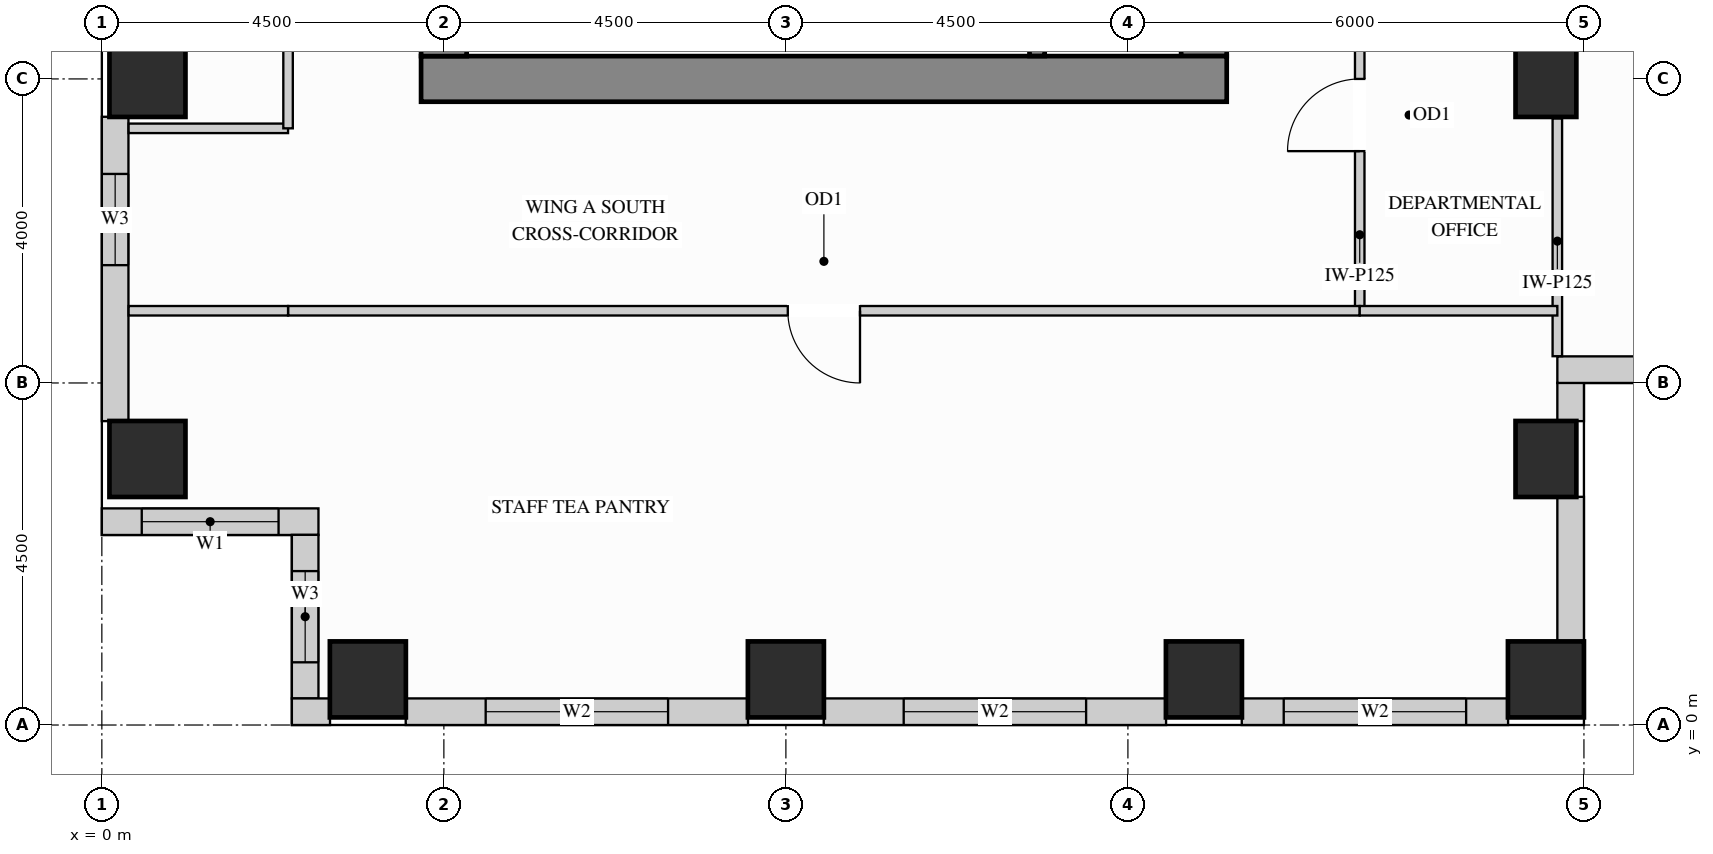
"""IFC4 building model, lengths in metres.
Left out: names, types, materials, properties, quantities, classifications, styles, units other than length and angle.
Written with IfcOpenShell. Run it as: python <this file> out.ifc"""

import sys

from ifc_helpers import new_model, si_unit, direction, frame, frame_2d, origin, origin_2d, place, context, subcontext, project, spatial, rectangle, extrude, source, transform, mapped, element, fill, save


model = new_model("IFC4")
c1 = context("Model", 3, precision=1e-05, world=origin(), true_north=direction((0.0, 1.0)))
c2 = subcontext(c1, "Body", "Model", "MODEL_VIEW")
j1 = project(units=[si_unit("LENGTHUNIT", "METRE"), si_unit("PLANEANGLEUNIT", "RADIAN")], contexts=[c1])
p1 = place(None, origin())
s1 = spatial("IfcSite", under=j1, at=p1, CompositionType="ELEMENT")
p2 = place(p1, origin())
s2 = spatial("IfcBuilding", under=s1, at=p2, CompositionType="ELEMENT")
p3 = place(p2, frame((0.0, 0.0, 146.7)))
s3 = spatial("IfcBuildingStorey", under=s2, at=p3, CompositionType="ELEMENT", Elevation=146.7)
m1 = source(origin(), c2, "Body", "SweptSolid", [
    extrude(rectangle(XDim=0.8, YDim=1.0, at=origin_2d()), origin(), (0.0, 0.0, 1.0), 3.4),
])
for number, where, z_axis, x_axis in (
    (1, (19.0, 3.5, 0.0), (0.0, 0.0, 1.0), (1.0, 0.0, 0.0)),
    (2, (19.0, 8.5, 0.0), (0.0, 0.0, 1.0), (1.0, 0.0, 0.0)),
):
    element("IfcColumn", number, at=place(p3, frame(where, z_axis=z_axis, x_axis=x_axis)), inside=s3, PredefinedType="COLUMN", context=c2, shape_type="MappedRepresentation", body=[
        mapped(m1, transform((0.0, 0.0, 0.0), x_axis=(1.0, 0.0, 0.0), y_axis=(0.0, 1.0, 0.0), z_axis=(0.0, 0.0, 1.0))),
    ])
m2 = source(origin(), c2, "Body", "SweptSolid", [
    extrude(rectangle(XDim=1.0, YDim=1.0, at=origin_2d()), origin(), (0.0, 0.0, 1.0), 3.4),
])
for number, where, z_axis, x_axis in (
    (3, (14.5, 0.6, 0.0), (0.0, 0.0, 1.0), (1.0, 0.0, 0.0)),
    (4, (19.0, 0.6, 0.0), (0.0, 0.0, 1.0), (1.0, 0.0, 0.0)),
    (5, (3.5, 0.6, 0.0), (0.0, 0.0, 1.0), (1.0, 0.0, 0.0)),
    (6, (9.0, 0.6, 0.0), (0.0, 0.0, 1.0), (1.0, 0.0, 0.0)),
    (7, (0.6, 3.5, 0.0), (0.0, 0.0, 1.0), (1.0, 0.0, 0.0)),
    (8, (0.6, 8.5, 0.0), (0.0, 0.0, 1.0), (1.0, 0.0, 0.0)),
):
    element("IfcColumn", number, at=place(p3, frame(where, z_axis=z_axis, x_axis=x_axis)), inside=s3, PredefinedType="COLUMN", context=c2, shape_type="MappedRepresentation", body=[
        mapped(m2, transform((0.0, 0.0, 0.0), x_axis=(1.0, 0.0, 0.0), y_axis=(0.0, 1.0, 0.0), z_axis=(0.0, 0.0, 1.0))),
    ])
m3 = source(origin(), c2, "Body", "SweptSolid", [
    extrude(rectangle(XDim=10.02, YDim=0.6, at=frame_2d((5.01, 0.0))), origin(), (0.0, 0.0, 1.0), 3.4),
])
p4 = place(p3, frame((14.5, 8.8, 0.0), z_axis=(0.0, 0.0, 1.0), x_axis=(0.0, 1.0, 0.0)))
e9 = element("IfcWall", 9, at=p4, inside=s3, PredefinedType="SHEAR", context=c2, shape_type="MappedRepresentation", body=[
    mapped(m3, transform((0.0, 0.0, 0.0), x_axis=(1.0, 0.0, 0.0), y_axis=(0.0, 1.0, 0.0), z_axis=(0.0, 0.0, 1.0))),
])
m4 = source(origin(), c2, "Body", "SweptSolid", [
    extrude(rectangle(XDim=10.6, YDim=0.6, at=frame_2d((5.3, 0.0))), origin(), (0.0, 0.0, 1.0), 3.4),
])
p5 = place(p3, frame((4.2, 8.5, 0.0), z_axis=(0.0, 0.0, 1.0), x_axis=(1.0, 0.0, 0.0)))
e10 = element("IfcWall", 10, at=p5, inside=s3, PredefinedType="SHEAR", context=c2, shape_type="MappedRepresentation", body=[
    mapped(m4, transform((0.0, 0.0, 0.0), x_axis=(1.0, 0.0, 0.0), y_axis=(0.0, 1.0, 0.0), z_axis=(0.0, 0.0, 1.0))),
])
m5 = source(origin(), c2, "Body", "SweptSolid", [
    extrude(rectangle(XDim=20.4, YDim=0.6, at=frame_2d((10.2, 0.0))), origin(), (0.0, 0.0, 1.0), 3.4),
])
p6 = place(p3, frame((4.5, 8.8, 0.0), z_axis=(0.0, 0.0, 1.0), x_axis=(0.0, 1.0, 0.0)))
e11 = element("IfcWall", 11, at=p6, inside=s3, PredefinedType="SHEAR", context=c2, shape_type="MappedRepresentation", body=[
    mapped(m5, transform((0.0, 0.0, 0.0), x_axis=(1.0, 0.0, 0.0), y_axis=(0.0, 1.0, 0.0), z_axis=(0.0, 0.0, 1.0))),
])
p7 = place(p3, frame((0.175, 8.002, 0.0), z_axis=(0.0, 0.0, 1.0), x_axis=(0.0, -1.0, 0.0)))
e12 = element("IfcWall", 12, at=p7, inside=s3, PredefinedType="SOLIDWALL", context=c2, shape_type="SweptSolid", body=[
    extrude(rectangle(XDim=4.004, YDim=0.35, at=frame_2d((2.002, 0.0))), origin(), (0.0, 0.0, 1.0), 2.612),
])
p8 = place(p7, frame((0.752, 0.0, 0.78)))
e13 = element("IfcOpeningElement", 13, at=p8, cuts=e12, PredefinedType="OPENING", context=c2, shape_type="SweptSolid", body=[
    extrude(rectangle(XDim=1.2, YDim=1.652, at=frame_2d((0.6, 0.826))), frame((0.0, 0.185, 0.0), z_axis=(0.0, -1.0, 0.0), x_axis=(1.0, 0.0, 0.0)), (0.0, 0.0, 1.0), 0.37),
])
p9 = place(p3, frame((0.0, 2.675, 0.0), z_axis=(0.0, 0.0, 1.0), x_axis=(1.0, 0.0, 0.0)))
e14 = element("IfcWall", 14, at=p9, inside=s3, PredefinedType="SOLIDWALL", context=c2, shape_type="SweptSolid", body=[
    extrude(rectangle(XDim=2.85, YDim=0.35, at=frame_2d((1.425, 0.0))), origin(), (0.0, 0.0, 1.0), 3.385),
])
p10 = place(p9, frame((0.525, 0.0, 0.78)))
e15 = element("IfcOpeningElement", 15, at=p10, cuts=e14, PredefinedType="OPENING", context=c2, shape_type="SweptSolid", body=[
    extrude(rectangle(XDim=1.8, YDim=2.1, at=frame_2d((0.9, 1.05))), frame((0.0, 0.185, 0.0), z_axis=(0.0, -1.0, 0.0), x_axis=(1.0, 0.0, 0.0)), (0.0, 0.0, 1.0), 0.37),
])
p11 = place(p3, frame((2.675, 2.502, 0.0), z_axis=(0.0, 0.0, 1.0), x_axis=(0.0, -1.0, 0.0)))
e16 = element("IfcWall", 16, at=p11, inside=s3, PredefinedType="SOLIDWALL", context=c2, shape_type="SweptSolid", body=[
    extrude(rectangle(XDim=2.154, YDim=0.35, at=frame_2d((1.077, 0.0))), origin(), (0.0, 0.0, 1.0), 3.385),
])
p12 = place(p11, frame((0.477, 0.0, 0.78)))
e17 = element("IfcOpeningElement", 17, at=p12, cuts=e16, PredefinedType="OPENING", context=c2, shape_type="SweptSolid", body=[
    extrude(rectangle(XDim=1.2, YDim=2.1, at=frame_2d((0.6, 1.05))), frame((0.0, 0.185, 0.0), z_axis=(0.0, -1.0, 0.0), x_axis=(1.0, 0.0, 0.0)), (0.0, 0.0, 1.0), 0.37),
])
m6 = source(origin(), c2, "Body", "SweptSolid", [
    extrude(rectangle(XDim=0.502, YDim=0.35, at=frame_2d((0.251, 0.0))), origin(), (0.0, 0.0, 1.0), 3.385),
])
p13 = place(p3, frame((2.5, 0.175, 0.0), z_axis=(0.0, 0.0, 1.0), x_axis=(1.0, 0.0, 0.0)))
e18 = element("IfcWall", 18, at=p13, inside=s3, PredefinedType="SOLIDWALL", context=c2, shape_type="MappedRepresentation", body=[
    mapped(m6, transform((0.0, 0.0, 0.0), x_axis=(1.0, 0.0, 0.0), y_axis=(0.0, 1.0, 0.0), z_axis=(0.0, 0.0, 1.0))),
])
p14 = place(p3, frame((3.998, 0.175, 0.0), z_axis=(0.0, 0.0, 1.0), x_axis=(1.0, 0.0, 0.0)))
e19 = element("IfcWall", 19, at=p14, inside=s3, PredefinedType="SOLIDWALL", context=c2, shape_type="SweptSolid", body=[
    extrude(rectangle(XDim=4.504, YDim=0.35, at=frame_2d((2.252, 0.0))), origin(), (0.0, 0.0, 1.0), 2.612),
])
p15 = place(p14, frame((1.052, 0.0, 0.78)))
e20 = element("IfcOpeningElement", 20, at=p15, cuts=e19, PredefinedType="OPENING", context=c2, shape_type="SweptSolid", body=[
    extrude(rectangle(XDim=2.4, YDim=1.652, at=frame_2d((1.2, 0.826))), frame((0.0, 0.185, 0.0), z_axis=(0.0, -1.0, 0.0), x_axis=(1.0, 0.0, 0.0)), (0.0, 0.0, 1.0), 0.37),
])
p16 = place(p3, frame((9.498, 0.175, 0.0), z_axis=(0.0, 0.0, 1.0), x_axis=(1.0, 0.0, 0.0)))
e21 = element("IfcWall", 21, at=p16, inside=s3, PredefinedType="SOLIDWALL", context=c2, shape_type="SweptSolid", body=[
    extrude(rectangle(XDim=4.504, YDim=0.35, at=frame_2d((2.252, 0.0))), origin(), (0.0, 0.0, 1.0), 2.612),
])
p17 = place(p16, frame((1.052, 0.0, 0.78)))
e22 = element("IfcOpeningElement", 22, at=p17, cuts=e21, PredefinedType="OPENING", context=c2, shape_type="SweptSolid", body=[
    extrude(rectangle(XDim=2.4, YDim=1.652, at=frame_2d((1.2, 0.826))), frame((0.0, 0.185, 0.0), z_axis=(0.0, -1.0, 0.0), x_axis=(1.0, 0.0, 0.0)), (0.0, 0.0, 1.0), 0.37),
])
p18 = place(p3, frame((14.998, 0.175, 0.0), z_axis=(0.0, 0.0, 1.0), x_axis=(1.0, 0.0, 0.0)))
e23 = element("IfcWall", 23, at=p18, inside=s3, PredefinedType="SOLIDWALL", context=c2, shape_type="SweptSolid", body=[
    extrude(rectangle(XDim=3.504, YDim=0.35, at=frame_2d((1.752, 0.0))), origin(), (0.0, 0.0, 1.0), 2.612),
])
p19 = place(p18, frame((0.552, 0.0, 0.78)))
e24 = element("IfcOpeningElement", 24, at=p19, cuts=e23, PredefinedType="OPENING", context=c2, shape_type="SweptSolid", body=[
    extrude(rectangle(XDim=2.4, YDim=1.652, at=frame_2d((1.2, 0.826))), frame((0.0, 0.185, 0.0), z_axis=(0.0, -1.0, 0.0), x_axis=(1.0, 0.0, 0.0)), (0.0, 0.0, 1.0), 0.37),
])
m7 = source(origin(), c2, "Body", "SweptSolid", [
    extrude(rectangle(XDim=1.904, YDim=0.35, at=frame_2d((0.952, 0.0))), origin(), (0.0, 0.0, 1.0), 2.612),
])
p20 = place(p3, frame((19.325, 1.098, 0.0), z_axis=(0.0, 0.0, 1.0), x_axis=(0.0, 1.0, 0.0)))
e25 = element("IfcWall", 25, at=p20, inside=s3, PredefinedType="SOLIDWALL", context=c2, shape_type="MappedRepresentation", body=[
    mapped(m7, transform((0.0, 0.0, 0.0), x_axis=(1.0, 0.0, 0.0), y_axis=(0.0, 1.0, 0.0), z_axis=(0.0, 0.0, 1.0))),
])
m8 = source(origin(), c2, "Body", "SweptSolid", [
    extrude(rectangle(XDim=0.504, YDim=0.35, at=frame_2d((0.252, 0.0))), origin(), (0.0, 0.0, 1.0), 2.773),
])
p21 = place(p3, frame((19.325, 3.998, 0.0), z_axis=(0.0, 0.0, 1.0), x_axis=(0.0, 1.0, 0.0)))
e26 = element("IfcWall", 26, at=p21, inside=s3, PredefinedType="SOLIDWALL", context=c2, shape_type="MappedRepresentation", body=[
    mapped(m8, transform((0.0, 0.0, 0.0), x_axis=(1.0, 0.0, 0.0), y_axis=(0.0, 1.0, 0.0), z_axis=(0.0, 0.0, 1.0))),
])
p22 = place(p3, frame((19.15, 4.675, 0.0), z_axis=(0.0, 0.0, 1.0), x_axis=(1.0, 0.0, 0.0)))
e27 = element("IfcWall", 27, at=p22, inside=s3, PredefinedType="SOLIDWALL", context=c2, shape_type="SweptSolid", body=[
    extrude(rectangle(XDim=14.98, YDim=0.35, at=frame_2d((7.49, 0.0))), origin(), (0.0, 0.0, 1.0), 3.385),
])
p23 = place(p22, frame((1.73, 0.0, 0.78)))
e28 = element("IfcOpeningElement", 28, at=p23, cuts=e27, PredefinedType="OPENING", context=c2, shape_type="SweptSolid", body=[
    extrude(rectangle(XDim=1.5, YDim=2.0, at=frame_2d((0.75, 1.0))), frame((0.0, 0.185, 0.0), z_axis=(0.0, -1.0, 0.0), x_axis=(1.0, 0.0, 0.0)), (0.0, 0.0, 1.0), 0.37),
])
p24 = place(p22, frame((4.64, 0.0, 0.78)))
e29 = element("IfcOpeningElement", 29, at=p24, cuts=e27, PredefinedType="OPENING", context=c2, shape_type="SweptSolid", body=[
    extrude(rectangle(XDim=1.5, YDim=2.0, at=frame_2d((0.75, 1.0))), frame((0.0, 0.185, 0.0), z_axis=(0.0, -1.0, 0.0), x_axis=(1.0, 0.0, 0.0)), (0.0, 0.0, 1.0), 0.37),
])
p25 = place(p22, frame((9.253, 0.0, 0.78)))
e30 = element("IfcOpeningElement", 30, at=p25, cuts=e27, PredefinedType="OPENING", context=c2, shape_type="SweptSolid", body=[
    extrude(rectangle(XDim=1.5, YDim=2.0, at=frame_2d((0.75, 1.0))), frame((0.0, 0.185, 0.0), z_axis=(0.0, -1.0, 0.0), x_axis=(1.0, 0.0, 0.0)), (0.0, 0.0, 1.0), 0.37),
])
p26 = place(p22, frame((11.957, 0.0, 0.78)))
e31 = element("IfcOpeningElement", 31, at=p26, cuts=e27, PredefinedType="OPENING", context=c2, shape_type="SweptSolid", body=[
    extrude(rectangle(XDim=1.5, YDim=2.0, at=frame_2d((0.75, 1.0))), frame((0.0, 0.185, 0.0), z_axis=(0.0, -1.0, 0.0), x_axis=(1.0, 0.0, 0.0)), (0.0, 0.0, 1.0), 0.37),
])
m9 = source(origin(), c2, "Body", "SweptSolid", [
    extrude(rectangle(XDim=3.128, YDim=0.125, at=frame_2d((1.564, 0.0))), origin(), (0.0, 0.0, 1.0), 2.773),
])
p27 = place(p3, frame((19.15, 4.852, 0.0), z_axis=(0.0, 0.0, 1.0), x_axis=(0.0, 1.0, 0.0)))
e32 = element("IfcWall", 32, at=p27, inside=s3, PredefinedType="PARTITIONING", context=c2, shape_type="MappedRepresentation", body=[
    mapped(m9, transform((0.0, 0.0, 0.0), x_axis=(1.0, 0.0, 0.0), y_axis=(0.0, 1.0, 0.0), z_axis=(0.0, 0.0, 1.0))),
])
p28 = place(p3, frame((16.55, 5.45, 0.0), z_axis=(0.0, 0.0, 1.0), x_axis=(0.0, 1.0, 0.0)))
e33 = element("IfcWall", 33, at=p28, inside=s3, PredefinedType="PARTITIONING", context=c2, shape_type="SweptSolid", body=[
    extrude(rectangle(XDim=5.15, YDim=0.125, at=frame_2d((2.575, 0.0))), origin(), (0.0, 0.0, 1.0), 3.385),
])
p29 = place(p28, frame((2.1, 0.0, 0.0)))
e34 = element("IfcOpeningElement", 34, at=p29, cuts=e33, PredefinedType="OPENING", context=c2, shape_type="SweptSolid", body=[
    extrude(rectangle(XDim=0.95, YDim=2.15, at=frame_2d((0.475, 1.075))), frame((0.0, 0.073, 0.0), z_axis=(0.0, -1.0, 0.0), x_axis=(1.0, 0.0, 0.0)), (0.0, 0.0, 1.0), 0.145),
])
m10 = source(origin(), c2, "Body", "SweptSolid", [
    extrude(rectangle(XDim=2.098, YDim=0.125, at=frame_2d((1.049, 0.0))), origin(), (0.0, 0.0, 1.0), 3.385),
])
p30 = place(p3, frame((0.352, 7.85, 0.0), z_axis=(0.0, 0.0, 1.0), x_axis=(1.0, 0.0, 0.0)))
e35 = element("IfcWall", 35, at=p30, inside=s3, PredefinedType="PARTITIONING", context=c2, shape_type="MappedRepresentation", body=[
    mapped(m10, transform((0.0, 0.0, 0.0), x_axis=(1.0, 0.0, 0.0), y_axis=(0.0, 1.0, 0.0), z_axis=(0.0, 0.0, 1.0))),
])
p31 = place(p3, frame((2.45, 5.45, 0.0), z_axis=(0.0, 0.0, 1.0), x_axis=(1.0, 0.0, 0.0)))
e36 = element("IfcWall", 36, at=p31, inside=s3, PredefinedType="PARTITIONING", context=c2, shape_type="SweptSolid", body=[
    extrude(rectangle(XDim=14.1, YDim=0.125, at=frame_2d((7.05, 0.0))), origin(), (0.0, 0.0, 1.0), 3.385),
])
p32 = place(p31, frame((6.575, 0.0, 0.0)))
e37 = element("IfcOpeningElement", 37, at=p32, cuts=e36, PredefinedType="OPENING", context=c2, shape_type="SweptSolid", body=[
    extrude(rectangle(XDim=0.95, YDim=2.15, at=frame_2d((0.475, 1.075))), frame((0.0, 0.073, 0.0), z_axis=(0.0, -1.0, 0.0), x_axis=(1.0, 0.0, 0.0)), (0.0, 0.0, 1.0), 0.145),
])
p33 = place(p3, frame((0.352, 5.45, 0.0), z_axis=(0.0, 0.0, 1.0), x_axis=(1.0, 0.0, 0.0)))
e38 = element("IfcWall", 38, at=p33, inside=s3, PredefinedType="PARTITIONING", context=c2, shape_type="MappedRepresentation", body=[
    mapped(m10, transform((0.0, 0.0, 0.0), x_axis=(1.0, 0.0, 0.0), y_axis=(0.0, 1.0, 0.0), z_axis=(0.0, 0.0, 1.0))),
])
m11 = source(origin(), c2, "Body", "SweptSolid", [
    extrude(rectangle(XDim=2.6, YDim=0.125, at=frame_2d((1.3, 0.0))), origin(), (0.0, 0.0, 1.0), 3.385),
])
p34 = place(p3, frame((16.55, 5.45, 0.0), z_axis=(0.0, 0.0, 1.0), x_axis=(1.0, 0.0, 0.0)))
e39 = element("IfcWall", 39, at=p34, inside=s3, PredefinedType="PARTITIONING", context=c2, shape_type="MappedRepresentation", body=[
    mapped(m11, transform((0.0, 0.0, 0.0), x_axis=(1.0, 0.0, 0.0), y_axis=(0.0, 1.0, 0.0), z_axis=(0.0, 0.0, 1.0))),
])
p35 = place(p3, frame((2.45, 7.85, 0.0), z_axis=(0.0, 0.0, 1.0), x_axis=(0.0, 1.0, 0.0)))
e40 = element("IfcWall", 40, at=p35, inside=s3, PredefinedType="PARTITIONING", context=c2, shape_type="SweptSolid", body=[
    extrude(rectangle(XDim=7.25, YDim=0.125, at=frame_2d((3.625, 0.0))), origin(), (0.0, 0.0, 1.0), 3.385),
])
p36 = place(p35, frame((3.15, 0.0, 0.0)))
e41 = element("IfcOpeningElement", 41, at=p36, cuts=e40, PredefinedType="OPENING", context=c2, shape_type="SweptSolid", body=[
    extrude(rectangle(XDim=0.95, YDim=2.15, at=frame_2d((0.475, 1.075))), frame((0.0, 0.073, 0.0), z_axis=(0.0, -1.0, 0.0), x_axis=(1.0, 0.0, 0.0)), (0.0, 0.0, 1.0), 0.145),
])
m12 = source(origin(), c2, "Body", "SweptSolid", [
    extrude(rectangle(XDim=3.753, YDim=0.2, at=frame_2d((1.876, 0.0))), origin(), (0.0, 0.0, 1.0), 3.4),
])
p37 = place(p3, frame((12.305, 8.802, 0.0), z_axis=(0.0, 0.0, 1.0), x_axis=(0.0, 1.0, 0.0)))
e42 = element("IfcWall", 42, at=p37, inside=s3, PredefinedType="SHEAR", context=c2, shape_type="MappedRepresentation", body=[
    mapped(m12, transform((0.0, 0.0, 0.0), x_axis=(1.0, 0.0, 0.0), y_axis=(0.0, 1.0, 0.0), z_axis=(0.0, 0.0, 1.0))),
])
m13 = source(origin(), c2, "Body", "SweptSolid", [
    extrude(rectangle(XDim=0.95, YDim=2.15, at=frame_2d((0.475, 1.075))), frame((0.0, 0.025, 0.0), z_axis=(0.0, -1.0, 0.0), x_axis=(1.0, 0.0, 0.0)), (0.0, 0.0, 1.0), 0.05),
])
p38 = place(p29, origin())
e43 = element("IfcDoor", 43, at=p38, inside=s3, OperationType="SINGLE_SWING_LEFT", PredefinedType="DOOR", context=c2, shape_type="MappedRepresentation", body=[
    mapped(m13, transform((0.0, 0.0, 0.0), x_axis=(1.0, 0.0, 0.0), y_axis=(0.0, 1.0, 0.0), z_axis=(0.0, 0.0, 1.0))),
])
fill(e34, e43)
p39 = place(p32, origin())
e44 = element("IfcDoor", 44, at=p39, inside=s3, OperationType="SINGLE_SWING_RIGHT", PredefinedType="DOOR", context=c2, shape_type="MappedRepresentation", body=[
    mapped(m13, transform((0.0, 0.0, 0.0), x_axis=(1.0, 0.0, 0.0), y_axis=(0.0, 1.0, 0.0), z_axis=(0.0, 0.0, 1.0))),
])
fill(e37, e44)
m14 = source(origin(), c2, "Body", "SweptSolid", [
    extrude(rectangle(XDim=1.8, YDim=2.1, at=frame_2d((0.9, 1.05))), frame((0.0, 0.03, 0.0), z_axis=(0.0, -1.0, 0.0), x_axis=(1.0, 0.0, 0.0)), (0.0, 0.0, 1.0), 0.06),
])
p40 = place(p10, origin())
e45 = element("IfcWindow", 45, at=p40, inside=s3, PartitioningType="SINGLE_PANEL", PredefinedType="WINDOW", context=c2, shape_type="MappedRepresentation", body=[
    mapped(m14, transform((0.0, 0.0, 0.0), x_axis=(1.0, 0.0, 0.0), y_axis=(0.0, 1.0, 0.0), z_axis=(0.0, 0.0, 1.0))),
])
fill(e15, e45)
m15 = source(origin(), c2, "Body", "SweptSolid", [
    extrude(rectangle(XDim=2.4, YDim=1.652, at=frame_2d((1.2, 0.826))), frame((0.0, 0.03, 0.0), z_axis=(0.0, -1.0, 0.0), x_axis=(1.0, 0.0, 0.0)), (0.0, 0.0, 1.0), 0.06),
])
p41 = place(p15, origin())
e46 = element("IfcWindow", 46, at=p41, inside=s3, PartitioningType="SINGLE_PANEL", PredefinedType="WINDOW", context=c2, shape_type="MappedRepresentation", body=[
    mapped(m15, transform((0.0, 0.0, 0.0), x_axis=(1.0, 0.0, 0.0), y_axis=(0.0, 1.0, 0.0), z_axis=(0.0, 0.0, 1.0))),
])
fill(e20, e46)
p42 = place(p17, origin())
e47 = element("IfcWindow", 47, at=p42, inside=s3, PartitioningType="SINGLE_PANEL", PredefinedType="WINDOW", context=c2, shape_type="MappedRepresentation", body=[
    mapped(m15, transform((0.0, 0.0, 0.0), x_axis=(1.0, 0.0, 0.0), y_axis=(0.0, 1.0, 0.0), z_axis=(0.0, 0.0, 1.0))),
])
fill(e22, e47)
p43 = place(p19, origin())
e48 = element("IfcWindow", 48, at=p43, inside=s3, PartitioningType="SINGLE_PANEL", PredefinedType="WINDOW", context=c2, shape_type="MappedRepresentation", body=[
    mapped(m15, transform((0.0, 0.0, 0.0), x_axis=(1.0, 0.0, 0.0), y_axis=(0.0, 1.0, 0.0), z_axis=(0.0, 0.0, 1.0))),
])
fill(e24, e48)
m16 = source(origin(), c2, "Body", "SweptSolid", [
    extrude(rectangle(XDim=1.2, YDim=1.652, at=frame_2d((0.6, 0.826))), frame((0.0, 0.03, 0.0), z_axis=(0.0, -1.0, 0.0), x_axis=(1.0, 0.0, 0.0)), (0.0, 0.0, 1.0), 0.06),
])
p44 = place(p8, origin())
e49 = element("IfcWindow", 49, at=p44, inside=s3, PartitioningType="SINGLE_PANEL", PredefinedType="WINDOW", context=c2, shape_type="MappedRepresentation", body=[
    mapped(m16, transform((0.0, 0.0, 0.0), x_axis=(1.0, 0.0, 0.0), y_axis=(0.0, 1.0, 0.0), z_axis=(0.0, 0.0, 1.0))),
])
fill(e13, e49)
m17 = source(origin(), c2, "Body", "SweptSolid", [
    extrude(rectangle(XDim=1.2, YDim=2.1, at=frame_2d((0.6, 1.05))), frame((0.0, 0.03, 0.0), z_axis=(0.0, -1.0, 0.0), x_axis=(1.0, 0.0, 0.0)), (0.0, 0.0, 1.0), 0.06),
])
p45 = place(p12, origin())
e50 = element("IfcWindow", 50, at=p45, inside=s3, PartitioningType="SINGLE_PANEL", PredefinedType="WINDOW", context=c2, shape_type="MappedRepresentation", body=[
    mapped(m17, transform((0.0, 0.0, 0.0), x_axis=(1.0, 0.0, 0.0), y_axis=(0.0, 1.0, 0.0), z_axis=(0.0, 0.0, 1.0))),
])
fill(e17, e50)
save(model, sys.argv[1])
